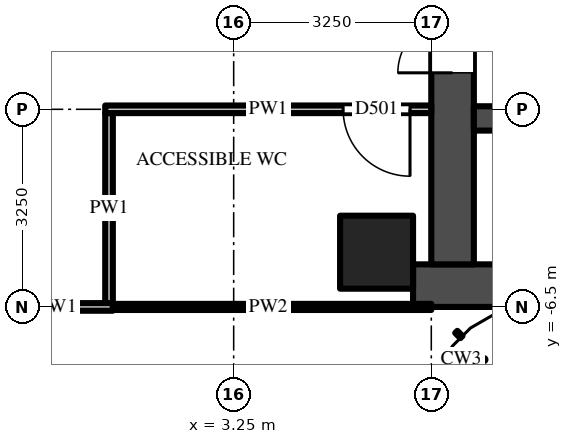
"""IFC4 building model, lengths in metres.
Left out: names, types, materials, properties, quantities, classifications, styles, units other than length and angle.
Written with IfcOpenShell. Run it as: python <this file> out.ifc"""

import sys

from ifc_helpers import new_model, si_unit, direction, frame, frame_2d, origin, origin_2d, place, context, subcontext, project, spatial, rectangle, extrude, source, transform, mapped, element, fill, save


model = new_model("IFC4")
c1 = context("Model", 3, precision=1e-05, world=origin(), true_north=direction((0.0, 1.0)))
c2 = subcontext(c1, "Body", "Model", "MODEL_VIEW")
j1 = project(units=[si_unit("LENGTHUNIT", "METRE"), si_unit("PLANEANGLEUNIT", "RADIAN")], contexts=[c1])
p1 = place(None, origin())
s1 = spatial("IfcSite", under=j1, at=p1, CompositionType="ELEMENT")
p2 = place(p1, origin())
s2 = spatial("IfcBuilding", under=s1, at=p2, CompositionType="ELEMENT")
p3 = place(p2, frame((0.0, 0.0, 162.0)))
s3 = spatial("IfcBuildingStorey", under=s2, at=p3, CompositionType="ELEMENT", Elevation=162.0)
m1 = source(origin(), c2, "Body", "SweptSolid", [
    extrude(rectangle(XDim=1.2, YDim=1.2, at=origin_2d()), origin(), (0.0, 0.0, 1.0), 3.9),
])
p4 = place(p3, frame((5.6, -5.6, 0.0), z_axis=(0.0, 0.0, 1.0), x_axis=(1.0, 0.0, 0.0)))
e1 = element("IfcColumn", 1, at=p4, inside=s3, PredefinedType="COLUMN", context=c2, shape_type="MappedRepresentation", body=[
    mapped(m1, transform((0.0, 0.0, 0.0))),
])
m2 = source(origin(), c2, "Body", "SweptSolid", [
    extrude(rectangle(XDim=16.55, YDim=0.7, at=frame_2d((8.275, 0.0))), origin(), (0.0, 0.0, 1.0), 3.7),
])
p5 = place(p3, frame((6.2, -6.15, 0.0), z_axis=(0.0, 0.0, 1.0), x_axis=(1.0, 0.0, 0.0)))
e2 = element("IfcWall", 2, at=p5, inside=s3, PredefinedType="SHEAR", context=c2, shape_type="MappedRepresentation", body=[
    mapped(m2, transform((0.0, 0.0, 0.0))),
])
m3 = source(origin(), c2, "Body", "SweptSolid", [
    extrude(rectangle(XDim=9.05, YDim=0.7, at=frame_2d((4.525, 0.0))), origin(), (0.0, 0.0, 1.0), 3.7),
])
p6 = place(p3, frame((6.85, -5.8, 0.0), z_axis=(0.0, 0.0, 1.0), x_axis=(0.0, 1.0, 0.0)))
e3 = element("IfcWall", 3, at=p6, inside=s3, PredefinedType="SHEAR", context=c2, shape_type="MappedRepresentation", body=[
    mapped(m3, transform((0.0, 0.0, 0.0))),
])
m4 = source(origin(), c2, "Body", "SweptSolid", [
    extrude(rectangle(XDim=1.8, YDim=2.1, at=frame_2d((0.9, 1.05))), frame((0.0, 0.36, 0.0), z_axis=(0.0, -1.0, 0.0), x_axis=(1.0, 0.0, 0.0)), (0.0, 0.0, 1.0), 0.72),
])
p7 = place(p6, frame((3.15, 0.0, 0.0)))
e4 = element("IfcOpeningElement", 4, at=p7, cuts=e3, PredefinedType="OPENING", context=c2, shape_type="MappedRepresentation", body=[
    mapped(m4, transform((0.0, 0.0, 0.0))),
])
m5 = source(origin(), c2, "Body", "SweptSolid", [
    extrude(rectangle(XDim=7.5, YDim=0.4, at=frame_2d((3.75, 0.0))), origin(), (0.0, 0.0, 1.0), 3.7),
])
p8 = place(p3, frame((7.2, -3.4, 0.0), z_axis=(0.0, 0.0, 1.0), x_axis=(1.0, 0.0, 0.0)))
e5 = element("IfcWall", 5, at=p8, inside=s3, PredefinedType="SHEAR", context=c2, shape_type="MappedRepresentation", body=[
    mapped(m5, transform((0.0, 0.0, 0.0))),
])
m6 = source(origin(), c2, "Body", "SweptSolid", [
    extrude(rectangle(XDim=1.0, YDim=2.1, at=frame_2d((0.5, 1.05))), frame((0.0, 0.21, 0.0), z_axis=(0.0, -1.0, 0.0), x_axis=(1.0, 0.0, 0.0)), (0.0, 0.0, 1.0), 0.42),
])
p9 = place(p8, frame((2.363, 0.0, 0.0)))
e6 = element("IfcOpeningElement", 6, at=p9, cuts=e5, PredefinedType="OPENING", context=c2, shape_type="MappedRepresentation", body=[
    mapped(m6, transform((0.0, 0.0, 0.0))),
])
m7 = source(origin(), c2, "Body", "SweptSolid", [
    extrude(rectangle(XDim=0.8, YDim=2.1, at=frame_2d((0.4, 1.05))), frame((0.0, 0.21, 0.0), z_axis=(0.0, -1.0, 0.0), x_axis=(1.0, 0.0, 0.0)), (0.0, 0.0, 1.0), 0.42),
])
p10 = place(p8, frame((6.087, 0.0, 0.0)))
e7 = element("IfcOpeningElement", 7, at=p10, cuts=e5, PredefinedType="OPENING", context=c2, shape_type="MappedRepresentation", body=[
    mapped(m7, transform((0.0, 0.0, 0.0))),
])
m8 = source(origin(), c2, "Body", "SweptSolid", [
    extrude(rectangle(XDim=3.137, YDim=0.125, at=frame_2d((1.569, 0.0))), origin(), (0.0, 0.0, 1.0), 2.997),
])
p11 = place(p3, frame((1.2, -3.312, 0.0), z_axis=(0.0, 0.0, 1.0), x_axis=(0.0, -1.0, 0.0)))
e8 = element("IfcWall", 8, at=p11, inside=s3, PredefinedType="PARTITIONING", context=c2, shape_type="MappedRepresentation", body=[
    mapped(m8, transform((0.0, 0.0, 0.0))),
])
m9 = source(origin(), c2, "Body", "SweptSolid", [
    extrude(rectangle(XDim=5.363, YDim=0.1, at=frame_2d((2.681, 0.0))), origin(), (0.0, 0.0, 1.0), 2.78),
])
p12 = place(p3, frame((1.137, -6.5, 0.0), z_axis=(0.0, 0.0, 1.0), x_axis=(1.0, 0.0, 0.0)))
e9 = element("IfcWall", 9, at=p12, inside=s3, PredefinedType="PARTITIONING", context=c2, shape_type="MappedRepresentation", body=[
    mapped(m9, transform((0.0, 0.0, 0.0))),
])
m10 = source(origin(), c2, "Body", "SweptSolid", [
    extrude(rectangle(XDim=1.825, YDim=0.125, at=frame_2d((0.913, 0.0))), origin(), (0.0, 0.0, 1.0), 3.7),
])
p13 = place(p3, frame((1.262, -6.5, 0.0), z_axis=(0.0, 0.0, 1.0), x_axis=(-1.0, 0.0, 0.0)))
e10 = element("IfcWall", 10, at=p13, inside=s3, PredefinedType="PARTITIONING", context=c2, shape_type="MappedRepresentation", body=[
    mapped(m10, transform((0.0, 0.0, 0.0))),
])
m11 = source(origin(), c2, "Body", "SweptSolid", [
    extrude(rectangle(XDim=5.363, YDim=0.125, at=frame_2d((2.681, 0.0))), origin(), (0.0, 0.0, 1.0), 2.997),
])
p14 = place(p3, frame((6.5, -3.25, 0.0), z_axis=(0.0, 0.0, 1.0), x_axis=(-1.0, 0.0, 0.0)))
e11 = element("IfcWall", 11, at=p14, inside=s3, PredefinedType="PARTITIONING", context=c2, shape_type="MappedRepresentation", body=[
    mapped(m11, transform((0.0, 0.0, 0.0))),
])
m12 = source(origin(), c2, "Body", "SweptSolid", [
    extrude(rectangle(XDim=1.1, YDim=2.1, at=frame_2d((0.55, 1.05))), frame((0.0, 0.073, 0.0), z_axis=(0.0, -1.0, 0.0), x_axis=(1.0, 0.0, 0.0)), (0.0, 0.0, 1.0), 0.145),
])
p15 = place(p14, frame((0.35, 0.0, 0.0)))
e12 = element("IfcOpeningElement", 12, at=p15, cuts=e11, PredefinedType="OPENING", context=c2, shape_type="MappedRepresentation", body=[
    mapped(m12, transform((0.0, 0.0, 0.0))),
])
m13 = source(origin(), c2, "Body", "SweptSolid", [
    extrude(rectangle(XDim=1.8, YDim=2.1, at=frame_2d((0.9, 1.05))), frame((0.0, -0.275, 0.0), z_axis=(0.0, -1.0, 0.0), x_axis=(1.0, 0.0, 0.0)), (0.0, 0.0, 1.0), 0.05),
])
p16 = place(p7, origin())
e13 = element("IfcDoor", 13, at=p16, inside=s3, OperationType="DOUBLE_DOOR_SINGLE_SWING", PredefinedType="DOOR", context=c2, shape_type="MappedRepresentation", body=[
    mapped(m13, transform((0.0, 0.0, 0.0))),
])
fill(e4, e13)
m14 = source(origin(), c2, "Body", "SweptSolid", [
    extrude(rectangle(XDim=1.1, YDim=2.1, at=frame_2d((0.55, 1.05))), frame((0.0, 0.025, 0.0), z_axis=(0.0, -1.0, 0.0), x_axis=(1.0, 0.0, 0.0)), (0.0, 0.0, 1.0), 0.05),
])
p17 = place(p15, origin())
e14 = element("IfcDoor", 14, at=p17, inside=s3, OperationType="SINGLE_SWING_LEFT", PredefinedType="DOOR", context=c2, shape_type="MappedRepresentation", body=[
    mapped(m14, transform((0.0, 0.0, 0.0))),
])
fill(e12, e14)
save(model, sys.argv[1])
